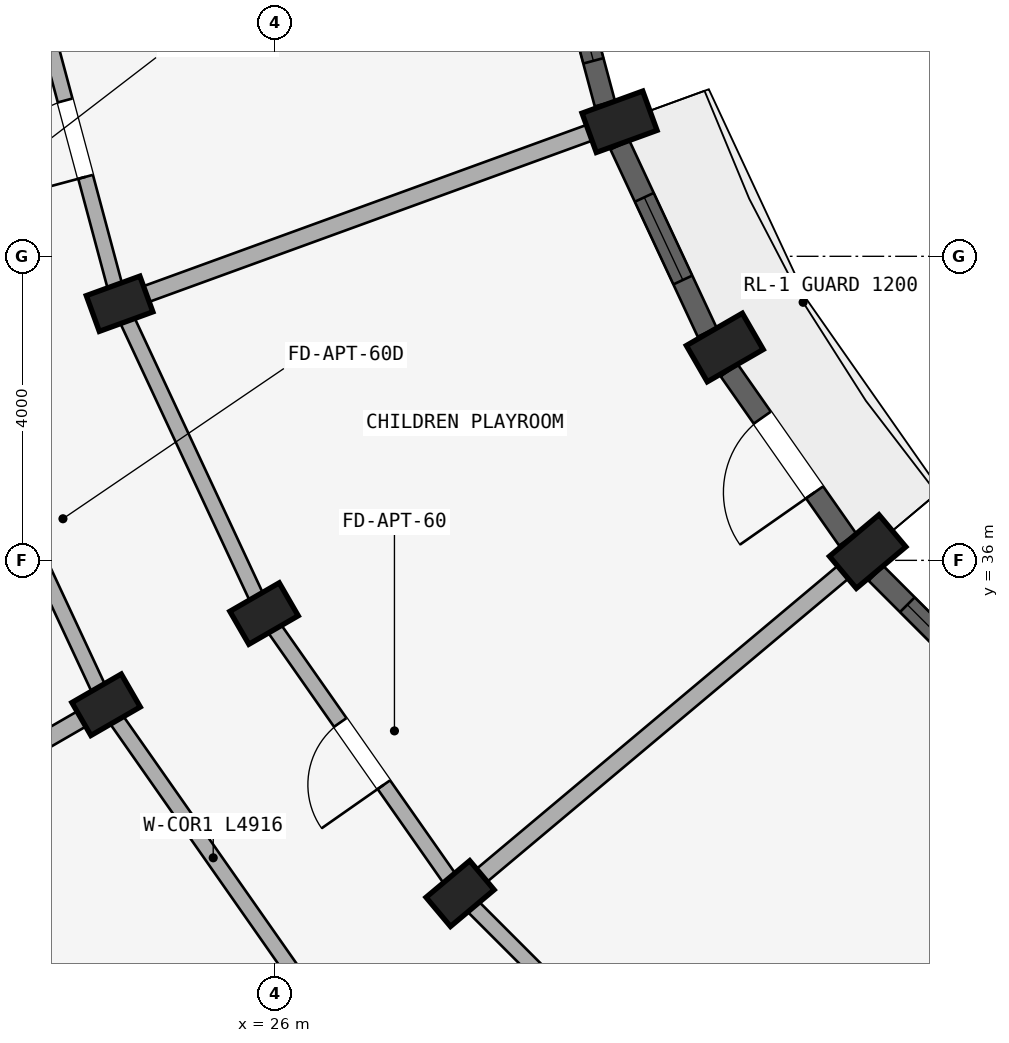
"""IFC4 building model, lengths in metres.
Left out: names, types, materials, properties, quantities, classifications, styles, units other than length and angle.
Written with IfcOpenShell. Run it as: python <this file> out.ifc"""

import sys

from ifc_helpers import new_model, si_unit, direction, frame, frame_2d, origin, origin_2d, place, context, subcontext, project, spatial, rectangle, extrude, element, fill, save


model = new_model("IFC4")
c1 = context("Model", 3, precision=1e-05, world=origin(), true_north=direction((0.0, 1.0)))
c2 = subcontext(c1, "Body", "Model", "MODEL_VIEW")
j1 = project(units=[si_unit("LENGTHUNIT", "METRE"), si_unit("PLANEANGLEUNIT", "RADIAN")], contexts=[c1])
p1 = place(None, origin())
s1 = spatial("IfcSite", under=j1, at=p1, CompositionType="ELEMENT")
p2 = place(p1, origin())
s2 = spatial("IfcBuilding", under=s1, at=p2, CompositionType="ELEMENT")
p3 = place(p2, frame((0.0, 0.0, 8.7)))
s3 = spatial("IfcBuildingStorey", under=s2, at=p3, CompositionType="ELEMENT", Elevation=8.7)
p4 = place(p3, frame((33.798, 36.115, 0.0), z_axis=(0.0, 0.0, 1.0), x_axis=(-0.642787609687, 0.766044443119, 0.0)))
e1 = element("IfcColumn", 1, at=p4, inside=s3, PredefinedType="COLUMN", context=c2, shape_type="SweptSolid", body=[
    extrude(rectangle(XDim=0.55, YDim=0.85, at=origin_2d()), origin(), (0.0, 0.0, 1.0), 2.93),
])
p5 = place(p3, frame((28.436, 31.616, 0.0), z_axis=(0.0, 0.0, 1.0), x_axis=(-0.642787609687, 0.766044443119, 0.0)))
e2 = element("IfcColumn", 2, at=p5, inside=s3, PredefinedType="COLUMN", context=c2, shape_type="SweptSolid", body=[
    extrude(rectangle(XDim=0.5, YDim=0.75, at=origin_2d()), origin(), (0.0, 0.0, 1.0), 2.93),
])
p6 = place(p3, frame((31.919, 38.8, 0.0), z_axis=(0.0, 0.0, 1.0), x_axis=(-0.5, 0.866025403784, 0.0)))
e3 = element("IfcColumn", 3, at=p6, inside=s3, PredefinedType="COLUMN", context=c2, shape_type="SweptSolid", body=[
    extrude(rectangle(XDim=0.55, YDim=0.85, at=origin_2d()), origin(), (0.0, 0.0, 1.0), 2.93),
])
for number, where, z_axis, x_axis in (
    (4, (25.856, 35.3, 0.0), (0.0, 0.0, 1.0), (-0.5, 0.866, 0.0)),
    (5, (23.778, 34.1, 0.0), (0.0, 0.0, 1.0), (-0.5, 0.866, 0.0)),
):
    element("IfcColumn", number, at=place(p3, frame(where, z_axis=z_axis, x_axis=x_axis)), inside=s3, PredefinedType="COLUMN", context=c2, shape_type="SweptSolid", body=[
        extrude(rectangle(XDim=0.5, YDim=0.75, at=origin_2d()), origin(), (0.0, 0.0, 1.0), 2.93),
    ])
p7 = place(p3, frame((30.534, 41.77, 0.0), z_axis=(0.0, 0.0, 1.0), x_axis=(-0.342020143326, 0.939692620786, 0.0)))
e6 = element("IfcColumn", 6, at=p7, inside=s3, PredefinedType="COLUMN", context=c2, shape_type="SweptSolid", body=[
    extrude(rectangle(XDim=0.55, YDim=0.85, at=origin_2d()), origin(), (0.0, 0.0, 1.0), 2.93),
])
p8 = place(p3, frame((23.956, 39.376, 0.0), z_axis=(0.0, 0.0, 1.0), x_axis=(-0.342020143326, 0.939692620786, 0.0)))
e7 = element("IfcColumn", 7, at=p8, inside=s3, PredefinedType="COLUMN", context=c2, shape_type="SweptSolid", body=[
    extrude(rectangle(XDim=0.5, YDim=0.75, at=origin_2d()), origin(), (0.0, 0.0, 1.0), 2.93),
])
p9 = place(p3, frame((31.616, 28.436, 0.0), z_axis=(0.0, 0.0, 1.0), x_axis=(-0.707106781187, 0.707106781187, 0.0)))
e8 = element("IfcWall", 8, at=p9, inside=s3, PredefinedType="STANDARD", context=c2, shape_type="SweptSolid", body=[
    extrude(rectangle(XDim=4.497, YDim=0.2, at=frame_2d((2.249, 0.0))), origin(), (0.0, 0.0, 1.0), 2.372),
])
p10 = place(p3, frame((28.436, 31.616, 0.0), z_axis=(0.0, 0.0, 1.0), x_axis=(-0.573571637217, 0.819155404658, 0.0)))
e9 = element("IfcWall", 9, at=p10, inside=s3, PredefinedType="STANDARD", context=c2, shape_type="SweptSolid", body=[
    extrude(rectangle(XDim=4.497, YDim=0.2, at=frame_2d((2.249, 0.0))), origin(), (0.0, 0.0, 1.0), 2.372),
])
p11 = place(p10, frame((1.749, 0.0, 0.0)))
e10 = element("IfcOpeningElement", 10, at=p11, cuts=e9, PredefinedType="OPENING", context=c2, shape_type="SweptSolid", body=[
    extrude(rectangle(XDim=1.0, YDim=2.15, at=frame_2d((0.5, 1.075))), frame((0.0, 0.11, 0.0), z_axis=(0.0, -1.0, 0.0), x_axis=(1.0, 0.0, 0.0)), (0.0, 0.0, 1.0), 0.22),
])
p12 = place(p3, frame((26.598, 30.073, 0.0), z_axis=(0.0, 0.0, 1.0), x_axis=(-0.573592335331, 0.819140911474, 0.0)))
e11 = element("IfcWall", 11, at=p12, inside=s3, PredefinedType="STANDARD", context=c2, shape_type="SweptSolid", body=[
    extrude(rectangle(XDim=4.916, YDim=0.2, at=frame_2d((2.458, 0.0))), origin(), (0.0, 0.0, 1.0), 2.372),
])
p13 = place(p3, frame((25.856, 35.3, 0.0), z_axis=(0.0, 0.0, 1.0), x_axis=(-0.422617978463, 0.906307919131, 0.0)))
e12 = element("IfcWall", 12, at=p13, inside=s3, PredefinedType="STANDARD", context=c2, shape_type="SweptSolid", body=[
    extrude(rectangle(XDim=4.497, YDim=0.2, at=frame_2d((2.249, 0.0))), origin(), (0.0, 0.0, 1.0), 2.372),
])
p14 = place(p3, frame((23.778, 34.1, 0.0), z_axis=(0.0, 0.0, 1.0), x_axis=(-0.422629854778, 0.906302381024, 0.0)))
e13 = element("IfcWall", 13, at=p14, inside=s3, PredefinedType="STANDARD", context=c2, shape_type="SweptSolid", body=[
    extrude(rectangle(XDim=4.915, YDim=0.2, at=frame_2d((2.458, 0.0))), origin(), (0.0, 0.0, 1.0), 2.372),
])
p15 = place(p14, frame((1.888, 0.0, 0.0)))
e14 = element("IfcOpeningElement", 14, at=p15, cuts=e13, PredefinedType="OPENING", context=c2, shape_type="SweptSolid", body=[
    extrude(rectangle(XDim=1.14, YDim=2.15, at=frame_2d((0.57, 1.075))), frame((0.0, 0.11, 0.0), z_axis=(0.0, -1.0, 0.0), x_axis=(1.0, 0.0, 0.0)), (0.0, 0.0, 1.0), 0.22),
])
p16 = place(p3, frame((23.956, 39.376, 0.0), z_axis=(0.0, 0.0, 1.0), x_axis=(-0.258787642463, 0.965934240054, 0.0)))
e15 = element("IfcWall", 15, at=p16, inside=s3, PredefinedType="STANDARD", context=c2, shape_type="SweptSolid", body=[
    extrude(rectangle(XDim=4.497, YDim=0.2, at=frame_2d((2.249, 0.0))), origin(), (0.0, 0.0, 1.0), 2.372),
])
p17 = place(p16, frame((1.729, 0.0, 0.0)))
e16 = element("IfcOpeningElement", 16, at=p17, cuts=e15, PredefinedType="OPENING", context=c2, shape_type="SweptSolid", body=[
    extrude(rectangle(XDim=1.04, YDim=2.15, at=frame_2d((0.52, 1.075))), frame((0.0, 0.11, 0.0), z_axis=(0.0, -1.0, 0.0), x_axis=(1.0, 0.0, 0.0)), (0.0, 0.0, 1.0), 0.22),
])
p18 = place(p3, frame((33.645, 35.987, 0.0), z_axis=(0.0, 0.0, 1.0), x_axis=(-0.766046761698, -0.642784846501, 0.0)))
e17 = element("IfcWall", 17, at=p18, inside=s3, PredefinedType="STANDARD", context=c2, shape_type="SweptSolid", body=[
    extrude(rectangle(XDim=6.75, YDim=0.22, at=frame_2d((3.375, 0.0))), origin(), (0.0, 0.0, 1.0), 2.372),
])
p19 = place(p3, frame((23.691, 34.05, 0.0), z_axis=(0.0, 0.0, 1.0), x_axis=(-0.866026648973, -0.499997843263, 0.0)))
e18 = element("IfcWall", 18, at=p19, inside=s3, PredefinedType="STANDARD", context=c2, shape_type="SweptSolid", body=[
    extrude(rectangle(XDim=17.42, YDim=0.23, at=frame_2d((8.71, 0.0))), origin(), (0.0, 0.0, 1.0), 2.372),
])
p20 = place(p3, frame((30.346, 41.702, 0.0), z_axis=(0.0, 0.0, 1.0), x_axis=(-0.939696231917, -0.342010221662, 0.0)))
e19 = element("IfcWall", 19, at=p20, inside=s3, PredefinedType="STANDARD", context=c2, shape_type="SweptSolid", body=[
    extrude(rectangle(XDim=6.75, YDim=0.22, at=frame_2d((3.375, 0.0))), origin(), (0.0, 0.0, 1.0), 2.372),
])
p21 = place(p3, frame((35.829, 33.908, 0.0), z_axis=(0.0, 0.0, 1.0), x_axis=(-0.707106781187, 0.707106781187, 0.0)))
e20 = element("IfcWall", 20, at=p21, inside=s3, PredefinedType="STANDARD", context=c2, shape_type="SweptSolid", body=[
    extrude(rectangle(XDim=2.718, YDim=0.275, at=frame_2d((1.359, 0.0))), origin(), (0.0, 0.0, 1.0), 2.472),
])
p22 = place(p21, frame((0.584, 0.0, 0.672)))
e21 = element("IfcOpeningElement", 21, at=p22, cuts=e20, PredefinedType="OPENING", context=c2, shape_type="SweptSolid", body=[
    extrude(rectangle(XDim=1.55, YDim=1.6, at=frame_2d((0.775, 0.8))), frame((0.0, 0.147, 0.0), z_axis=(0.0, -1.0, 0.0), x_axis=(1.0, 0.0, 0.0)), (0.0, 0.0, 1.0), 0.295),
])
p23 = place(p3, frame((33.535, 36.273, 0.0), z_axis=(0.0, 0.0, 1.0), x_axis=(-0.573546755948, 0.81917282593, 0.0)))
e22 = element("IfcWall", 22, at=p23, inside=s3, PredefinedType="STANDARD", context=c2, shape_type="SweptSolid", body=[
    extrude(rectangle(XDim=2.718, YDim=0.275, at=frame_2d((1.359, 0.0))), origin(), (0.0, 0.0, 1.0), 2.472),
])
p24 = place(p23, frame((0.759, 0.0, 0.0)))
e23 = element("IfcOpeningElement", 23, at=p24, cuts=e22, PredefinedType="OPENING", context=c2, shape_type="SweptSolid", body=[
    extrude(rectangle(XDim=1.2, YDim=2.15, at=frame_2d((0.6, 1.075))), frame((0.0, 0.147, 0.0), z_axis=(0.0, -1.0, 0.0), x_axis=(1.0, 0.0, 0.0)), (0.0, 0.0, 1.0), 0.295),
])
p25 = place(p3, frame((31.687, 39.001, 0.0), z_axis=(0.0, 0.0, 1.0), x_axis=(-0.422610022166, 0.906311629168, 0.0)))
e24 = element("IfcWall", 24, at=p25, inside=s3, PredefinedType="STANDARD", context=c2, shape_type="SweptSolid", body=[
    extrude(rectangle(XDim=2.718, YDim=0.275, at=frame_2d((1.359, 0.0))), origin(), (0.0, 0.0, 1.0), 2.472),
])
p26 = place(p25, frame((0.759, 0.0, 0.772)))
e25 = element("IfcOpeningElement", 25, at=p26, cuts=e24, PredefinedType="OPENING", context=c2, shape_type="SweptSolid", body=[
    extrude(rectangle(XDim=1.2, YDim=1.5, at=frame_2d((0.6, 0.75))), frame((0.0, 0.147, 0.0), z_axis=(0.0, -1.0, 0.0), x_axis=(1.0, 0.0, 0.0)), (0.0, 0.0, 1.0), 0.295),
])
p27 = place(p3, frame((30.341, 42.008, 0.0), z_axis=(0.0, 0.0, 1.0), x_axis=(-0.258819907011, 0.965925595341, 0.0)))
e26 = element("IfcWall", 26, at=p27, inside=s3, PredefinedType="STANDARD", context=c2, shape_type="SweptSolid", body=[
    extrude(rectangle(XDim=2.718, YDim=0.275, at=frame_2d((1.359, 0.0))), origin(), (0.0, 0.0, 1.0), 2.472),
])
p28 = place(p27, frame((0.584, 0.0, 0.672)))
e27 = element("IfcOpeningElement", 27, at=p28, cuts=e26, PredefinedType="OPENING", context=c2, shape_type="SweptSolid", body=[
    extrude(rectangle(XDim=1.55, YDim=1.6, at=frame_2d((0.775, 0.8))), frame((0.0, 0.147, 0.0), z_axis=(0.0, -1.0, 0.0), x_axis=(1.0, 0.0, 0.0)), (0.0, 0.0, 1.0), 0.295),
])
p29 = place(p22, origin())
e28 = element("IfcWindow", 28, at=p29, inside=s3, PartitioningType="DOUBLE_PANEL_VERTICAL", PredefinedType="WINDOW", context=c2, shape_type="SweptSolid", body=[
    extrude(rectangle(XDim=1.55, YDim=1.6, at=frame_2d((0.775, 0.8))), frame((0.0, 0.03, 0.0), z_axis=(0.0, -1.0, 0.0), x_axis=(1.0, 0.0, 0.0)), (0.0, 0.0, 1.0), 0.06),
])
fill(e21, e28)
p30 = place(p26, origin())
e29 = element("IfcWindow", 29, at=p30, inside=s3, PartitioningType="SINGLE_PANEL", PredefinedType="WINDOW", context=c2, shape_type="SweptSolid", body=[
    extrude(rectangle(XDim=1.2, YDim=1.5, at=frame_2d((0.6, 0.75))), frame((0.0, 0.03, 0.0), z_axis=(0.0, -1.0, 0.0), x_axis=(1.0, 0.0, 0.0)), (0.0, 0.0, 1.0), 0.06),
])
fill(e25, e29)
p31 = place(p28, origin())
e30 = element("IfcWindow", 30, at=p31, inside=s3, PartitioningType="DOUBLE_PANEL_VERTICAL", PredefinedType="WINDOW", context=c2, shape_type="SweptSolid", body=[
    extrude(rectangle(XDim=1.55, YDim=1.6, at=frame_2d((0.775, 0.8))), frame((0.0, 0.03, 0.0), z_axis=(0.0, -1.0, 0.0), x_axis=(1.0, 0.0, 0.0)), (0.0, 0.0, 1.0), 0.06),
])
fill(e27, e30)
p32 = place(p11, origin())
e31 = element("IfcDoor", 31, at=p32, inside=s3, OperationType="SINGLE_SWING_LEFT", PredefinedType="DOOR", context=c2, shape_type="SweptSolid", body=[
    extrude(rectangle(XDim=1.0, YDim=2.15, at=frame_2d((0.5, 1.075))), frame((0.0, 0.025, 0.0), z_axis=(0.0, -1.0, 0.0), x_axis=(1.0, 0.0, 0.0)), (0.0, 0.0, 1.0), 0.05),
])
fill(e10, e31)
p33 = place(p17, frame((1.04, 0.0, 0.0), z_axis=(0.0, 0.0, 1.0), x_axis=(-1.0, 0.0, 0.0)))
e32 = element("IfcDoor", 32, at=p33, inside=s3, OperationType="SINGLE_SWING_RIGHT", PredefinedType="DOOR", context=c2, shape_type="SweptSolid", body=[
    extrude(rectangle(XDim=1.04, YDim=2.15, at=frame_2d((0.52, 1.075))), frame((0.0, 0.025, 0.0), z_axis=(0.0, -1.0, 0.0), x_axis=(1.0, 0.0, 0.0)), (0.0, 0.0, 1.0), 0.05),
])
fill(e16, e32)
p34 = place(p24, frame((1.2, 0.0, 0.0), z_axis=(0.0, 0.0, 1.0), x_axis=(-1.0, 0.0, 0.0)))
e33 = element("IfcDoor", 33, at=p34, inside=s3, OperationType="SINGLE_SWING_RIGHT", PredefinedType="DOOR", context=c2, shape_type="SweptSolid", body=[
    extrude(rectangle(XDim=1.2, YDim=2.15, at=frame_2d((0.6, 1.075))), frame((0.0, 0.025, 0.0), z_axis=(0.0, -1.0, 0.0), x_axis=(1.0, 0.0, 0.0)), (0.0, 0.0, 1.0), 0.05),
])
fill(e23, e33)
save(model, sys.argv[1])
